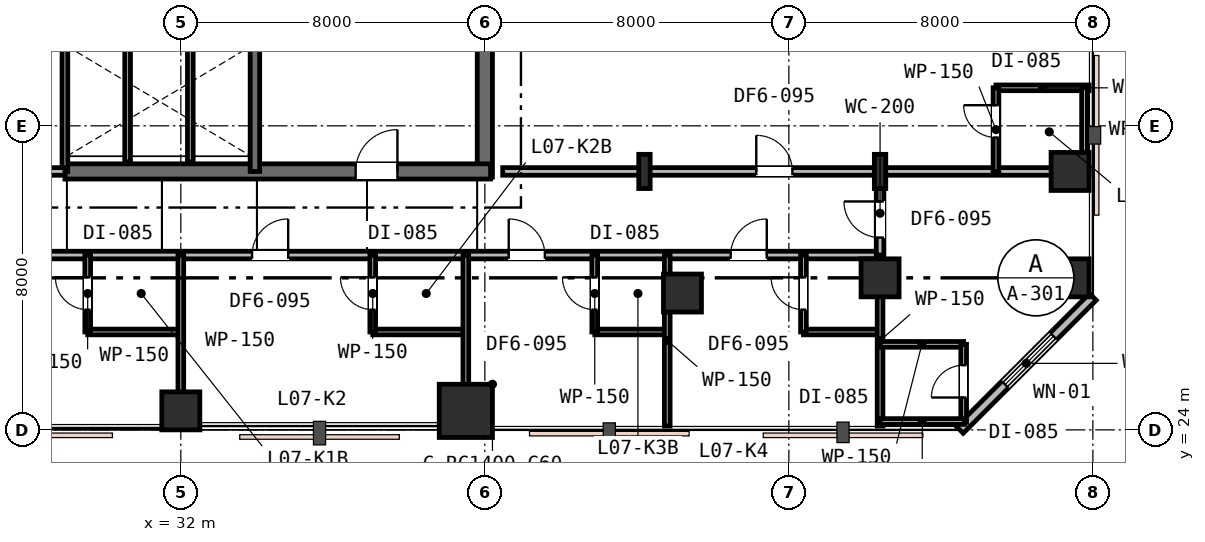
"""IFC4 building model, lengths in metres.
Left out: names, types, materials, properties, quantities, classifications, styles, units other than length and angle.
Written with IfcOpenShell. Run it as: python <this file> out.ifc"""

import sys

from ifc_helpers import new_model, si_unit, direction, frame, frame_2d, origin, origin_2d, place, context, subcontext, project, spatial, rectangle, i_section, extrude, element, fill, save


model = new_model("IFC4")
c1 = context("Model", 3, precision=1e-05, world=origin(), true_north=direction((0.0, 1.0)))
c2 = subcontext(c1, "Body", "Model", "MODEL_VIEW")
j1 = project(units=[si_unit("LENGTHUNIT", "METRE"), si_unit("PLANEANGLEUNIT", "RADIAN")], contexts=[c1])
p1 = place(None, origin())
s1 = spatial("IfcSite", under=j1, at=p1, CompositionType="ELEMENT")
p2 = place(p1, origin())
s2 = spatial("IfcBuilding", under=s1, at=p2, CompositionType="ELEMENT")
p3 = place(p2, frame((0.0, 0.0, 33.0)))
s3 = spatial("IfcBuildingStorey", under=s2, at=p3, CompositionType="ELEMENT", Elevation=33.0)
p4 = place(p3, frame((40.0, 30.65, 0.0), z_axis=(0.0, 0.0, 1.0), x_axis=(0.0, 1.0, 0.0)))
e1 = element("IfcWall", 1, at=p4, inside=s3, PredefinedType="SHEAR", context=c2, shape_type="SweptSolid", body=[
    extrude(rectangle(XDim=12.3, YDim=0.4, at=frame_2d((6.15, 0.0))), origin(), (0.0, 0.0, 1.0), 3.6),
])
p5 = place(p3, frame((28.95, 30.8, 0.0), z_axis=(0.0, 0.0, 1.0), x_axis=(1.0, 0.0, 0.0)))
e2 = element("IfcWall", 2, at=p5, inside=s3, PredefinedType="SHEAR", context=c2, shape_type="SweptSolid", body=[
    extrude(rectangle(XDim=11.2, YDim=0.4, at=frame_2d((5.6, 0.0))), origin(), (0.0, 0.0, 1.0), 3.6),
])
p6 = place(p5, frame((7.65, 0.0, 0.0)))
e3 = element("IfcOpeningElement", 3, at=p6, cuts=e2, PredefinedType="OPENING", context=c2, shape_type="SweptSolid", body=[
    extrude(rectangle(XDim=1.1, YDim=2.15, at=frame_2d((0.55, 1.075))), frame((0.0, 0.21, 0.0), z_axis=(0.0, -1.0, 0.0), x_axis=(1.0, 0.0, 0.0)), (0.0, 0.0, 1.0), 0.42),
])
p7 = place(p3, frame((33.95, 30.8, 0.0), z_axis=(0.0, 0.0, 1.0), x_axis=(0.0, 1.0, 0.0)))
e4 = element("IfcWall", 4, at=p7, inside=s3, PredefinedType="SHEAR", context=c2, shape_type="SweptSolid", body=[
    extrude(rectangle(XDim=6.45, YDim=0.25, at=frame_2d((3.225, 0.0))), origin(), (0.0, 0.0, 1.0), 3.6),
])
p8 = place(p3, frame((32.0, 24.5, 0.0), z_axis=(0.0, 0.0, 1.0), x_axis=(1.0, 0.0, 0.0)))
e5 = element("IfcColumn", 5, at=p8, inside=s3, PredefinedType="COLUMN", context=c2, shape_type="SweptSolid", body=[
    extrude(rectangle(XDim=1.0, YDim=1.0, at=origin_2d()), origin(), (0.0, 0.0, 1.0), 3.6),
])
p9 = place(p3, frame((39.5, 24.5, 0.0), z_axis=(0.0, 0.0, 1.0), x_axis=(1.0, 0.0, 0.0)))
e6 = element("IfcColumn", 6, at=p9, inside=s3, PredefinedType="COLUMN", context=c2, shape_type="SweptSolid", body=[
    extrude(rectangle(XDim=1.4, YDim=1.4, at=origin_2d()), origin(), (0.0, 0.0, 1.0), 3.6),
])
for number, where, z_axis, x_axis in (
    (7, (45.2, 27.6, 0.0), (0.0, 0.0, 1.0), (1.0, 0.0, 0.0)),
    (8, (50.4, 28.0, 0.0), (0.0, 0.0, 1.0), (1.0, 0.0, 0.0)),
    (9, (55.4, 28.0, 0.0), (0.0, 0.0, 1.0), (1.0, 0.0, 0.0)),
    (10, (55.4, 30.8, 0.0), (0.0, 0.0, 1.0), (1.0, 0.0, 0.0)),
):
    element("IfcColumn", number, at=place(p3, frame(where, z_axis=z_axis, x_axis=x_axis)), inside=s3, PredefinedType="COLUMN", context=c2, shape_type="SweptSolid", body=[
        extrude(rectangle(XDim=1.0, YDim=1.0, at=origin_2d()), origin(), (0.0, 0.0, 1.0), 3.6),
    ])
for number, where, z_axis, x_axis in (
    (11, (44.2, 30.8, 0.0), (0.0, 0.0, 1.0), (1.0, 0.0, 0.0)),
    (12, (50.4, 30.8, 0.0), (0.0, 0.0, 1.0), (1.0, 0.0, 0.0)),
):
    element("IfcColumn", number, at=place(p3, frame(where, z_axis=z_axis, x_axis=x_axis)), inside=s3, PredefinedType="COLUMN", context=c2, shape_type="SweptSolid", body=[
        extrude(i_section(OverallWidth=0.3, OverallDepth=0.9, WebThickness=0.018, FlangeThickness=0.035, FilletRadius=0.03, at=origin_2d()), origin(), (0.0, 0.0, 1.0), 3.6),
    ])
p10 = place(p3, frame((52.5, 24.0, 0.0), z_axis=(0.0, 0.0, 1.0), x_axis=(0.707106781187, 0.707106781187, 0.0)))
e13 = element("IfcWall", 13, at=p10, inside=s3, PredefinedType="STANDARD", context=c2, shape_type="SweptSolid", body=[
    extrude(rectangle(XDim=4.95, YDim=0.25, at=frame_2d((2.475, 0.0))), origin(), (0.0, 0.0, 1.0), 3.33),
])
p11 = place(p10, frame((1.685, 0.0, 0.75)))
e14 = element("IfcOpeningElement", 14, at=p11, cuts=e13, PredefinedType="OPENING", context=c2, shape_type="SweptSolid", body=[
    extrude(rectangle(XDim=1.8, YDim=1.85, at=frame_2d((0.9, 0.925))), frame((0.0, 0.135, 0.0), z_axis=(0.0, -1.0, 0.0), x_axis=(1.0, 0.0, 0.0)), (0.0, 0.0, 1.0), 0.27),
])
p12 = place(p3, frame((28.95, 30.8, 0.0), z_axis=(0.0, 0.0, 1.0), x_axis=(0.0, 1.0, 0.0)))
e15 = element("IfcWall", 15, at=p12, inside=s3, PredefinedType="PLUMBINGWALL", context=c2, shape_type="SweptSolid", body=[
    extrude(rectangle(XDim=3.45, YDim=0.15, at=frame_2d((1.725, 0.0))), origin(), (0.0, 0.0, 1.0), 3.33),
])
p13 = place(p3, frame((27.05, 30.8, 0.0), z_axis=(0.0, 0.0, 1.0), x_axis=(1.0, 0.0, 0.0)))
e16 = element("IfcWall", 16, at=p13, inside=s3, PredefinedType="PARTITIONING", context=c2, shape_type="SweptSolid", body=[
    extrude(rectangle(XDim=1.9, YDim=0.2, at=frame_2d((0.95, 0.0))), origin(), (0.0, 0.0, 1.0), 3.33),
])
p14 = place(p13, frame((0.4, 0.0, 0.0)))
e17 = element("IfcOpeningElement", 17, at=p14, cuts=e16, PredefinedType="OPENING", context=c2, shape_type="SweptSolid", body=[
    extrude(rectangle(XDim=1.1, YDim=2.15, at=frame_2d((0.55, 1.075))), frame((0.0, 0.11, 0.0), z_axis=(0.0, -1.0, 0.0), x_axis=(1.0, 0.0, 0.0)), (0.0, 0.0, 1.0), 0.22),
])
for number, where, z_axis, x_axis in (
    (18, (30.6, 31.05, 0.0), (0.0, 0.0, 1.0), (0.0, 1.0, 0.0)),
    (19, (32.25, 31.05, 0.0), (0.0, 0.0, 1.0), (0.0, 1.0, 0.0)),
):
    element("IfcWall", number, at=place(p3, frame(where, z_axis=z_axis, x_axis=x_axis)), inside=s3, PredefinedType="PLUMBINGWALL", context=c2, shape_type="SweptSolid", body=[
        extrude(rectangle(XDim=3.1, YDim=0.15, at=frame_2d((1.55, 0.0))), origin(), (0.0, 0.0, 1.0), 3.33),
    ])
p15 = place(p3, frame((13.8, 28.6, 0.0), z_axis=(0.0, 0.0, 1.0), x_axis=(1.0, 0.0, 0.0)))
e20 = element("IfcWall", 20, at=p15, inside=s3, PredefinedType="PARTITIONING", context=c2, shape_type="SweptSolid", body=[
    extrude(rectangle(XDim=36.6, YDim=0.2, at=frame_2d((18.3, 0.0))), origin(), (0.0, 0.0, 1.0), 2.68),
])
p16 = place(p15, frame((12.3, 0.0, 0.0)))
e21 = element("IfcOpeningElement", 21, at=p16, cuts=e20, PredefinedType="OPENING", context=c2, shape_type="SweptSolid", body=[
    extrude(rectangle(XDim=0.95, YDim=2.15, at=frame_2d((0.475, 1.075))), frame((0.0, 0.11, 0.0), z_axis=(0.0, -1.0, 0.0), x_axis=(1.0, 0.0, 0.0)), (0.0, 0.0, 1.0), 0.22),
])
p17 = place(p15, frame((20.075, 0.0, 0.0)))
e22 = element("IfcOpeningElement", 22, at=p17, cuts=e20, PredefinedType="OPENING", context=c2, shape_type="SweptSolid", body=[
    extrude(rectangle(XDim=0.95, YDim=2.15, at=frame_2d((0.475, 1.075))), frame((0.0, 0.11, 0.0), z_axis=(0.0, -1.0, 0.0), x_axis=(1.0, 0.0, 0.0)), (0.0, 0.0, 1.0), 0.22),
])
p18 = place(p15, frame((26.829, 0.0, 0.0)))
e23 = element("IfcOpeningElement", 23, at=p18, cuts=e20, PredefinedType="OPENING", context=c2, shape_type="SweptSolid", body=[
    extrude(rectangle(XDim=0.95, YDim=2.15, at=frame_2d((0.475, 1.075))), frame((0.0, 0.11, 0.0), z_axis=(0.0, -1.0, 0.0), x_axis=(1.0, 0.0, 0.0)), (0.0, 0.0, 1.0), 0.22),
])
p19 = place(p15, frame((32.669, 0.0, 0.0)))
e24 = element("IfcOpeningElement", 24, at=p19, cuts=e20, PredefinedType="OPENING", context=c2, shape_type="SweptSolid", body=[
    extrude(rectangle(XDim=0.95, YDim=2.15, at=frame_2d((0.475, 1.075))), frame((0.0, 0.11, 0.0), z_axis=(0.0, -1.0, 0.0), x_axis=(1.0, 0.0, 0.0)), (0.0, 0.0, 1.0), 0.22),
])
p20 = place(p3, frame((29.55, 26.576, 0.0), z_axis=(0.0, 0.0, 1.0), x_axis=(1.0, 0.0, 0.0)))
e25 = element("IfcWall", 25, at=p20, inside=s3, PredefinedType="PARTITIONING", context=c2, shape_type="SweptSolid", body=[
    extrude(rectangle(XDim=2.45, YDim=0.15, at=frame_2d((1.225, 0.0))), origin(), (0.0, 0.0, 1.0), 3.33),
])
p21 = place(p3, frame((29.55, 26.576, 0.0), z_axis=(0.0, 0.0, 1.0), x_axis=(0.0, 1.0, 0.0)))
e26 = element("IfcWall", 26, at=p21, inside=s3, PredefinedType="PARTITIONING", context=c2, shape_type="SweptSolid", body=[
    extrude(rectangle(XDim=2.024, YDim=0.15, at=frame_2d((1.012, 0.0))), origin(), (0.0, 0.0, 1.0), 3.33),
])
p22 = place(p21, frame((0.587, 0.0, 0.0)))
e27 = element("IfcOpeningElement", 27, at=p22, cuts=e26, PredefinedType="OPENING", context=c2, shape_type="SweptSolid", body=[
    extrude(rectangle(XDim=0.85, YDim=2.15, at=frame_2d((0.425, 1.075))), frame((0.0, 0.085, 0.0), z_axis=(0.0, -1.0, 0.0), x_axis=(1.0, 0.0, 0.0)), (0.0, 0.0, 1.0), 0.17),
])
p23 = place(p3, frame((32.0, 28.6, 0.0), z_axis=(0.0, 0.0, 1.0), x_axis=(0.0, -1.0, 0.0)))
e28 = element("IfcWall", 28, at=p23, inside=s3, PredefinedType="PARTITIONING", context=c2, shape_type="SweptSolid", body=[
    extrude(rectangle(XDim=4.5, YDim=0.15, at=frame_2d((2.25, 0.0))), origin(), (0.0, 0.0, 1.0), 2.87),
])
p24 = place(p3, frame((37.05, 26.576, 0.0), z_axis=(0.0, 0.0, 1.0), x_axis=(1.0, 0.0, 0.0)))
e29 = element("IfcWall", 29, at=p24, inside=s3, PredefinedType="PARTITIONING", context=c2, shape_type="SweptSolid", body=[
    extrude(rectangle(XDim=2.45, YDim=0.15, at=frame_2d((1.225, 0.0))), origin(), (0.0, 0.0, 1.0), 2.68),
])
p25 = place(p3, frame((37.05, 26.576, 0.0), z_axis=(0.0, 0.0, 1.0), x_axis=(0.0, 1.0, 0.0)))
e30 = element("IfcWall", 30, at=p25, inside=s3, PredefinedType="PARTITIONING", context=c2, shape_type="SweptSolid", body=[
    extrude(rectangle(XDim=2.024, YDim=0.15, at=frame_2d((1.012, 0.0))), origin(), (0.0, 0.0, 1.0), 2.92),
])
p26 = place(p25, frame((0.587, 0.0, 0.0)))
e31 = element("IfcOpeningElement", 31, at=p26, cuts=e30, PredefinedType="OPENING", context=c2, shape_type="SweptSolid", body=[
    extrude(rectangle(XDim=0.85, YDim=2.15, at=frame_2d((0.425, 1.075))), frame((0.0, 0.085, 0.0), z_axis=(0.0, -1.0, 0.0), x_axis=(1.0, 0.0, 0.0)), (0.0, 0.0, 1.0), 0.17),
])
p27 = place(p3, frame((39.5, 28.6, 0.0), z_axis=(0.0, 0.0, 1.0), x_axis=(0.0, -1.0, 0.0)))
e32 = element("IfcWall", 32, at=p27, inside=s3, PredefinedType="PARTITIONING", context=c2, shape_type="SweptSolid", body=[
    extrude(rectangle(XDim=4.5, YDim=0.15, at=frame_2d((2.25, 0.0))), origin(), (0.0, 0.0, 1.0), 2.68),
])
p28 = place(p3, frame((42.892, 26.576, 0.0), z_axis=(0.0, 0.0, 1.0), x_axis=(1.0, 0.0, 0.0)))
e33 = element("IfcWall", 33, at=p28, inside=s3, PredefinedType="PARTITIONING", context=c2, shape_type="SweptSolid", body=[
    extrude(rectangle(XDim=1.908, YDim=0.15, at=frame_2d((0.954, 0.0))), origin(), (0.0, 0.0, 1.0), 3.33),
])
p29 = place(p3, frame((42.892, 26.576, 0.0), z_axis=(0.0, 0.0, 1.0), x_axis=(0.0, 1.0, 0.0)))
e34 = element("IfcWall", 34, at=p29, inside=s3, PredefinedType="PARTITIONING", context=c2, shape_type="SweptSolid", body=[
    extrude(rectangle(XDim=2.024, YDim=0.15, at=frame_2d((1.012, 0.0))), origin(), (0.0, 0.0, 1.0), 3.33),
])
p30 = place(p29, frame((0.587, 0.0, 0.0)))
e35 = element("IfcOpeningElement", 35, at=p30, cuts=e34, PredefinedType="OPENING", context=c2, shape_type="SweptSolid", body=[
    extrude(rectangle(XDim=0.85, YDim=2.15, at=frame_2d((0.425, 1.075))), frame((0.0, 0.085, 0.0), z_axis=(0.0, -1.0, 0.0), x_axis=(1.0, 0.0, 0.0)), (0.0, 0.0, 1.0), 0.17),
])
p31 = place(p3, frame((44.8, 28.6, 0.0), z_axis=(0.0, 0.0, 1.0), x_axis=(0.0, -1.0, 0.0)))
e36 = element("IfcWall", 36, at=p31, inside=s3, PredefinedType="PARTITIONING", context=c2, shape_type="SweptSolid", body=[
    extrude(rectangle(XDim=4.5, YDim=0.15, at=frame_2d((2.25, 0.0))), origin(), (0.0, 0.0, 1.0), 2.68),
])
p32 = place(p3, frame((48.384, 26.576, 0.0), z_axis=(0.0, 0.0, 1.0), x_axis=(1.0, 0.0, 0.0)))
e37 = element("IfcWall", 37, at=p32, inside=s3, PredefinedType="PARTITIONING", context=c2, shape_type="SweptSolid", body=[
    extrude(rectangle(XDim=2.016, YDim=0.15, at=frame_2d((1.008, 0.0))), origin(), (0.0, 0.0, 1.0), 3.33),
])
p33 = place(p3, frame((48.384, 26.576, 0.0), z_axis=(0.0, 0.0, 1.0), x_axis=(0.0, 1.0, 0.0)))
e38 = element("IfcWall", 38, at=p33, inside=s3, PredefinedType="PARTITIONING", context=c2, shape_type="SweptSolid", body=[
    extrude(rectangle(XDim=2.024, YDim=0.15, at=frame_2d((1.012, 0.0))), origin(), (0.0, 0.0, 1.0), 3.33),
])
p34 = place(p33, frame((0.587, 0.0, 0.0)))
e39 = element("IfcOpeningElement", 39, at=p34, cuts=e38, PredefinedType="OPENING", context=c2, shape_type="SweptSolid", body=[
    extrude(rectangle(XDim=0.85, YDim=2.15, at=frame_2d((0.425, 1.075))), frame((0.0, 0.085, 0.0), z_axis=(0.0, -1.0, 0.0), x_axis=(1.0, 0.0, 0.0)), (0.0, 0.0, 1.0), 0.17),
])
p35 = place(p3, frame((50.4, 28.6, 0.0), z_axis=(0.0, 0.0, 1.0), x_axis=(0.0, -1.0, 0.0)))
e40 = element("IfcWall", 40, at=p35, inside=s3, PredefinedType="PARTITIONING", context=c2, shape_type="SweptSolid", body=[
    extrude(rectangle(XDim=4.5, YDim=0.15, at=frame_2d((2.25, 0.0))), origin(), (0.0, 0.0, 1.0), 2.68),
])
p36 = place(p3, frame((40.47, 30.8, 0.0), z_axis=(0.0, 0.0, 1.0), x_axis=(1.0, 0.0, 0.0)))
e41 = element("IfcWall", 41, at=p36, inside=s3, PredefinedType="PARTITIONING", context=c2, shape_type="SweptSolid", body=[
    extrude(rectangle(XDim=15.43, YDim=0.2, at=frame_2d((7.715, 0.0))), origin(), (0.0, 0.0, 1.0), 2.68),
])
p37 = place(p36, frame((6.673, 0.0, 0.0)))
e42 = element("IfcOpeningElement", 42, at=p37, cuts=e41, PredefinedType="OPENING", context=c2, shape_type="SweptSolid", body=[
    extrude(rectangle(XDim=0.95, YDim=2.15, at=frame_2d((0.475, 1.075))), frame((0.0, 0.11, 0.0), z_axis=(0.0, -1.0, 0.0), x_axis=(1.0, 0.0, 0.0)), (0.0, 0.0, 1.0), 0.22),
])
p38 = place(p3, frame((53.45, 33.0, 0.0), z_axis=(0.0, 0.0, 1.0), x_axis=(1.0, 0.0, 0.0)))
e43 = element("IfcWall", 43, at=p38, inside=s3, PredefinedType="PARTITIONING", context=c2, shape_type="SweptSolid", body=[
    extrude(rectangle(XDim=2.45, YDim=0.15, at=frame_2d((1.225, 0.0))), origin(), (0.0, 0.0, 1.0), 2.87),
])
p39 = place(p3, frame((53.45, 30.8, 0.0), z_axis=(0.0, 0.0, 1.0), x_axis=(0.0, 1.0, 0.0)))
e44 = element("IfcWall", 44, at=p39, inside=s3, PredefinedType="PARTITIONING", context=c2, shape_type="SweptSolid", body=[
    extrude(rectangle(XDim=2.2, YDim=0.15, at=frame_2d((1.1, 0.0))), origin(), (0.0, 0.0, 1.0), 2.68),
])
p40 = place(p39, frame((0.892, 0.0, 0.0)))
e45 = element("IfcOpeningElement", 45, at=p40, cuts=e44, PredefinedType="OPENING", context=c2, shape_type="SweptSolid", body=[
    extrude(rectangle(XDim=0.85, YDim=2.15, at=frame_2d((0.425, 1.075))), frame((0.0, 0.085, 0.0), z_axis=(0.0, -1.0, 0.0), x_axis=(1.0, 0.0, 0.0)), (0.0, 0.0, 1.0), 0.17),
])
p41 = place(p3, frame((55.78, 33.0, 0.0), z_axis=(0.0, 0.0, 1.0), x_axis=(0.0, -1.0, 0.0)))
e46 = element("IfcWall", 46, at=p41, inside=s3, PredefinedType="PARTITIONING", context=c2, shape_type="SweptSolid", body=[
    extrude(rectangle(XDim=2.2, YDim=0.15, at=frame_2d((1.1, 0.0))), origin(), (0.0, 0.0, 1.0), 2.68),
])
p42 = place(p3, frame((50.4, 28.6, 0.0), z_axis=(0.0, 0.0, 1.0), x_axis=(0.0, 1.0, 0.0)))
e47 = element("IfcWall", 47, at=p42, inside=s3, PredefinedType="PARTITIONING", context=c2, shape_type="SweptSolid", body=[
    extrude(rectangle(XDim=2.2, YDim=0.2, at=frame_2d((1.1, 0.0))), origin(), (0.0, 0.0, 1.0), 2.68),
])
p43 = place(p42, frame((0.46, 0.0, 0.0)))
e48 = element("IfcOpeningElement", 48, at=p43, cuts=e47, PredefinedType="OPENING", context=c2, shape_type="SweptSolid", body=[
    extrude(rectangle(XDim=0.95, YDim=2.15, at=frame_2d((0.475, 1.075))), frame((0.0, 0.11, 0.0), z_axis=(0.0, -1.0, 0.0), x_axis=(1.0, 0.0, 0.0)), (0.0, 0.0, 1.0), 0.22),
])
p44 = place(p3, frame((50.4, 26.25, 0.0), z_axis=(0.0, 0.0, 1.0), x_axis=(1.0, 0.0, 0.0)))
e49 = element("IfcWall", 49, at=p44, inside=s3, PredefinedType="PARTITIONING", context=c2, shape_type="SweptSolid", body=[
    extrude(rectangle(XDim=2.2, YDim=0.15, at=frame_2d((1.1, 0.0))), origin(), (0.0, 0.0, 1.0), 3.33),
])
p45 = place(p3, frame((52.6, 24.2, 0.0), z_axis=(0.0, 0.0, 1.0), x_axis=(0.0, 1.0, 0.0)))
e50 = element("IfcWall", 50, at=p45, inside=s3, PredefinedType="PARTITIONING", context=c2, shape_type="SweptSolid", body=[
    extrude(rectangle(XDim=2.05, YDim=0.15, at=frame_2d((1.025, 0.0))), origin(), (0.0, 0.0, 1.0), 3.33),
])
p46 = place(p45, frame((0.651, 0.0, 0.0)))
e51 = element("IfcOpeningElement", 51, at=p46, cuts=e50, PredefinedType="OPENING", context=c2, shape_type="SweptSolid", body=[
    extrude(rectangle(XDim=0.85, YDim=2.15, at=frame_2d((0.425, 1.075))), frame((0.0, 0.085, 0.0), z_axis=(0.0, -1.0, 0.0), x_axis=(1.0, 0.0, 0.0)), (0.0, 0.0, 1.0), 0.17),
])
p47 = place(p3, frame((52.62, 24.22, 0.0), z_axis=(0.0, 0.0, 1.0), x_axis=(-1.0, 0.0, 0.0)))
e52 = element("IfcWall", 52, at=p47, inside=s3, PredefinedType="PARTITIONING", context=c2, shape_type="SweptSolid", body=[
    extrude(rectangle(XDim=2.22, YDim=0.15, at=frame_2d((1.11, 0.0))), origin(), (0.0, 0.0, 1.0), 3.33),
])
p48 = place(p11, origin())
e53 = element("IfcWindow", 53, at=p48, inside=s3, PartitioningType="SINGLE_PANEL", PredefinedType="WINDOW", context=c2, shape_type="SweptSolid", body=[
    extrude(rectangle(XDim=1.8, YDim=1.85, at=frame_2d((0.9, 0.925))), frame((0.0, 0.03, 0.0), z_axis=(0.0, -1.0, 0.0), x_axis=(1.0, 0.0, 0.0)), (0.0, 0.0, 1.0), 0.06),
])
fill(e14, e53)
p49 = place(p6, origin())
e54 = element("IfcDoor", 54, at=p49, inside=s3, OperationType="SINGLE_SWING_RIGHT", PredefinedType="DOOR", context=c2, shape_type="SweptSolid", body=[
    extrude(rectangle(XDim=1.1, YDim=2.15, at=frame_2d((0.55, 1.075))), frame((0.0, 0.025, 0.0), z_axis=(0.0, -1.0, 0.0), x_axis=(1.0, 0.0, 0.0)), (0.0, 0.0, 1.0), 0.05),
])
fill(e3, e54)
p50 = place(p22, origin())
e55 = element("IfcDoor", 55, at=p50, inside=s3, OperationType="SINGLE_SWING_RIGHT", PredefinedType="DOOR", context=c2, shape_type="SweptSolid", body=[
    extrude(rectangle(XDim=0.85, YDim=2.15, at=frame_2d((0.425, 1.075))), frame((0.0, 0.025, 0.0), z_axis=(0.0, -1.0, 0.0), x_axis=(1.0, 0.0, 0.0)), (0.0, 0.0, 1.0), 0.05),
])
fill(e27, e55)
p51 = place(p17, origin())
e56 = element("IfcDoor", 56, at=p51, inside=s3, OperationType="SINGLE_SWING_RIGHT", PredefinedType="DOOR", context=c2, shape_type="SweptSolid", body=[
    extrude(rectangle(XDim=0.95, YDim=2.15, at=frame_2d((0.475, 1.075))), frame((0.0, 0.025, 0.0), z_axis=(0.0, -1.0, 0.0), x_axis=(1.0, 0.0, 0.0)), (0.0, 0.0, 1.0), 0.05),
])
fill(e22, e56)
p52 = place(p26, origin())
e57 = element("IfcDoor", 57, at=p52, inside=s3, OperationType="SINGLE_SWING_RIGHT", PredefinedType="DOOR", context=c2, shape_type="SweptSolid", body=[
    extrude(rectangle(XDim=0.85, YDim=2.15, at=frame_2d((0.425, 1.075))), frame((0.0, 0.025, 0.0), z_axis=(0.0, -1.0, 0.0), x_axis=(1.0, 0.0, 0.0)), (0.0, 0.0, 1.0), 0.05),
])
fill(e31, e57)
p53 = place(p18, origin())
e58 = element("IfcDoor", 58, at=p53, inside=s3, OperationType="SINGLE_SWING_LEFT", PredefinedType="DOOR", context=c2, shape_type="SweptSolid", body=[
    extrude(rectangle(XDim=0.95, YDim=2.15, at=frame_2d((0.475, 1.075))), frame((0.0, 0.025, 0.0), z_axis=(0.0, -1.0, 0.0), x_axis=(1.0, 0.0, 0.0)), (0.0, 0.0, 1.0), 0.05),
])
fill(e23, e58)
p54 = place(p30, origin())
e59 = element("IfcDoor", 59, at=p54, inside=s3, OperationType="SINGLE_SWING_RIGHT", PredefinedType="DOOR", context=c2, shape_type="SweptSolid", body=[
    extrude(rectangle(XDim=0.85, YDim=2.15, at=frame_2d((0.425, 1.075))), frame((0.0, 0.025, 0.0), z_axis=(0.0, -1.0, 0.0), x_axis=(1.0, 0.0, 0.0)), (0.0, 0.0, 1.0), 0.05),
])
fill(e35, e59)
p55 = place(p19, origin())
e60 = element("IfcDoor", 60, at=p55, inside=s3, OperationType="SINGLE_SWING_RIGHT", PredefinedType="DOOR", context=c2, shape_type="SweptSolid", body=[
    extrude(rectangle(XDim=0.95, YDim=2.15, at=frame_2d((0.475, 1.075))), frame((0.0, 0.025, 0.0), z_axis=(0.0, -1.0, 0.0), x_axis=(1.0, 0.0, 0.0)), (0.0, 0.0, 1.0), 0.05),
])
fill(e24, e60)
p56 = place(p34, origin())
e61 = element("IfcDoor", 61, at=p56, inside=s3, OperationType="SINGLE_SWING_RIGHT", PredefinedType="DOOR", context=c2, shape_type="SweptSolid", body=[
    extrude(rectangle(XDim=0.85, YDim=2.15, at=frame_2d((0.425, 1.075))), frame((0.0, 0.025, 0.0), z_axis=(0.0, -1.0, 0.0), x_axis=(1.0, 0.0, 0.0)), (0.0, 0.0, 1.0), 0.05),
])
fill(e39, e61)
p57 = place(p37, origin())
e62 = element("IfcDoor", 62, at=p57, inside=s3, OperationType="SINGLE_SWING_LEFT", PredefinedType="DOOR", context=c2, shape_type="SweptSolid", body=[
    extrude(rectangle(XDim=0.95, YDim=2.15, at=frame_2d((0.475, 1.075))), frame((0.0, 0.025, 0.0), z_axis=(0.0, -1.0, 0.0), x_axis=(1.0, 0.0, 0.0)), (0.0, 0.0, 1.0), 0.05),
])
fill(e42, e62)
p58 = place(p40, origin())
e63 = element("IfcDoor", 63, at=p58, inside=s3, OperationType="SINGLE_SWING_RIGHT", PredefinedType="DOOR", context=c2, shape_type="SweptSolid", body=[
    extrude(rectangle(XDim=0.85, YDim=2.15, at=frame_2d((0.425, 1.075))), frame((0.0, 0.025, 0.0), z_axis=(0.0, -1.0, 0.0), x_axis=(1.0, 0.0, 0.0)), (0.0, 0.0, 1.0), 0.05),
])
fill(e45, e63)
p59 = place(p43, origin())
e64 = element("IfcDoor", 64, at=p59, inside=s3, OperationType="SINGLE_SWING_RIGHT", PredefinedType="DOOR", context=c2, shape_type="SweptSolid", body=[
    extrude(rectangle(XDim=0.95, YDim=2.15, at=frame_2d((0.475, 1.075))), frame((0.0, 0.025, 0.0), z_axis=(0.0, -1.0, 0.0), x_axis=(1.0, 0.0, 0.0)), (0.0, 0.0, 1.0), 0.05),
])
fill(e48, e64)
p60 = place(p46, origin())
e65 = element("IfcDoor", 65, at=p60, inside=s3, OperationType="SINGLE_SWING_LEFT", PredefinedType="DOOR", context=c2, shape_type="SweptSolid", body=[
    extrude(rectangle(XDim=0.85, YDim=2.15, at=frame_2d((0.425, 1.075))), frame((0.0, 0.025, 0.0), z_axis=(0.0, -1.0, 0.0), x_axis=(1.0, 0.0, 0.0)), (0.0, 0.0, 1.0), 0.05),
])
fill(e51, e65)
save(model, sys.argv[1])
